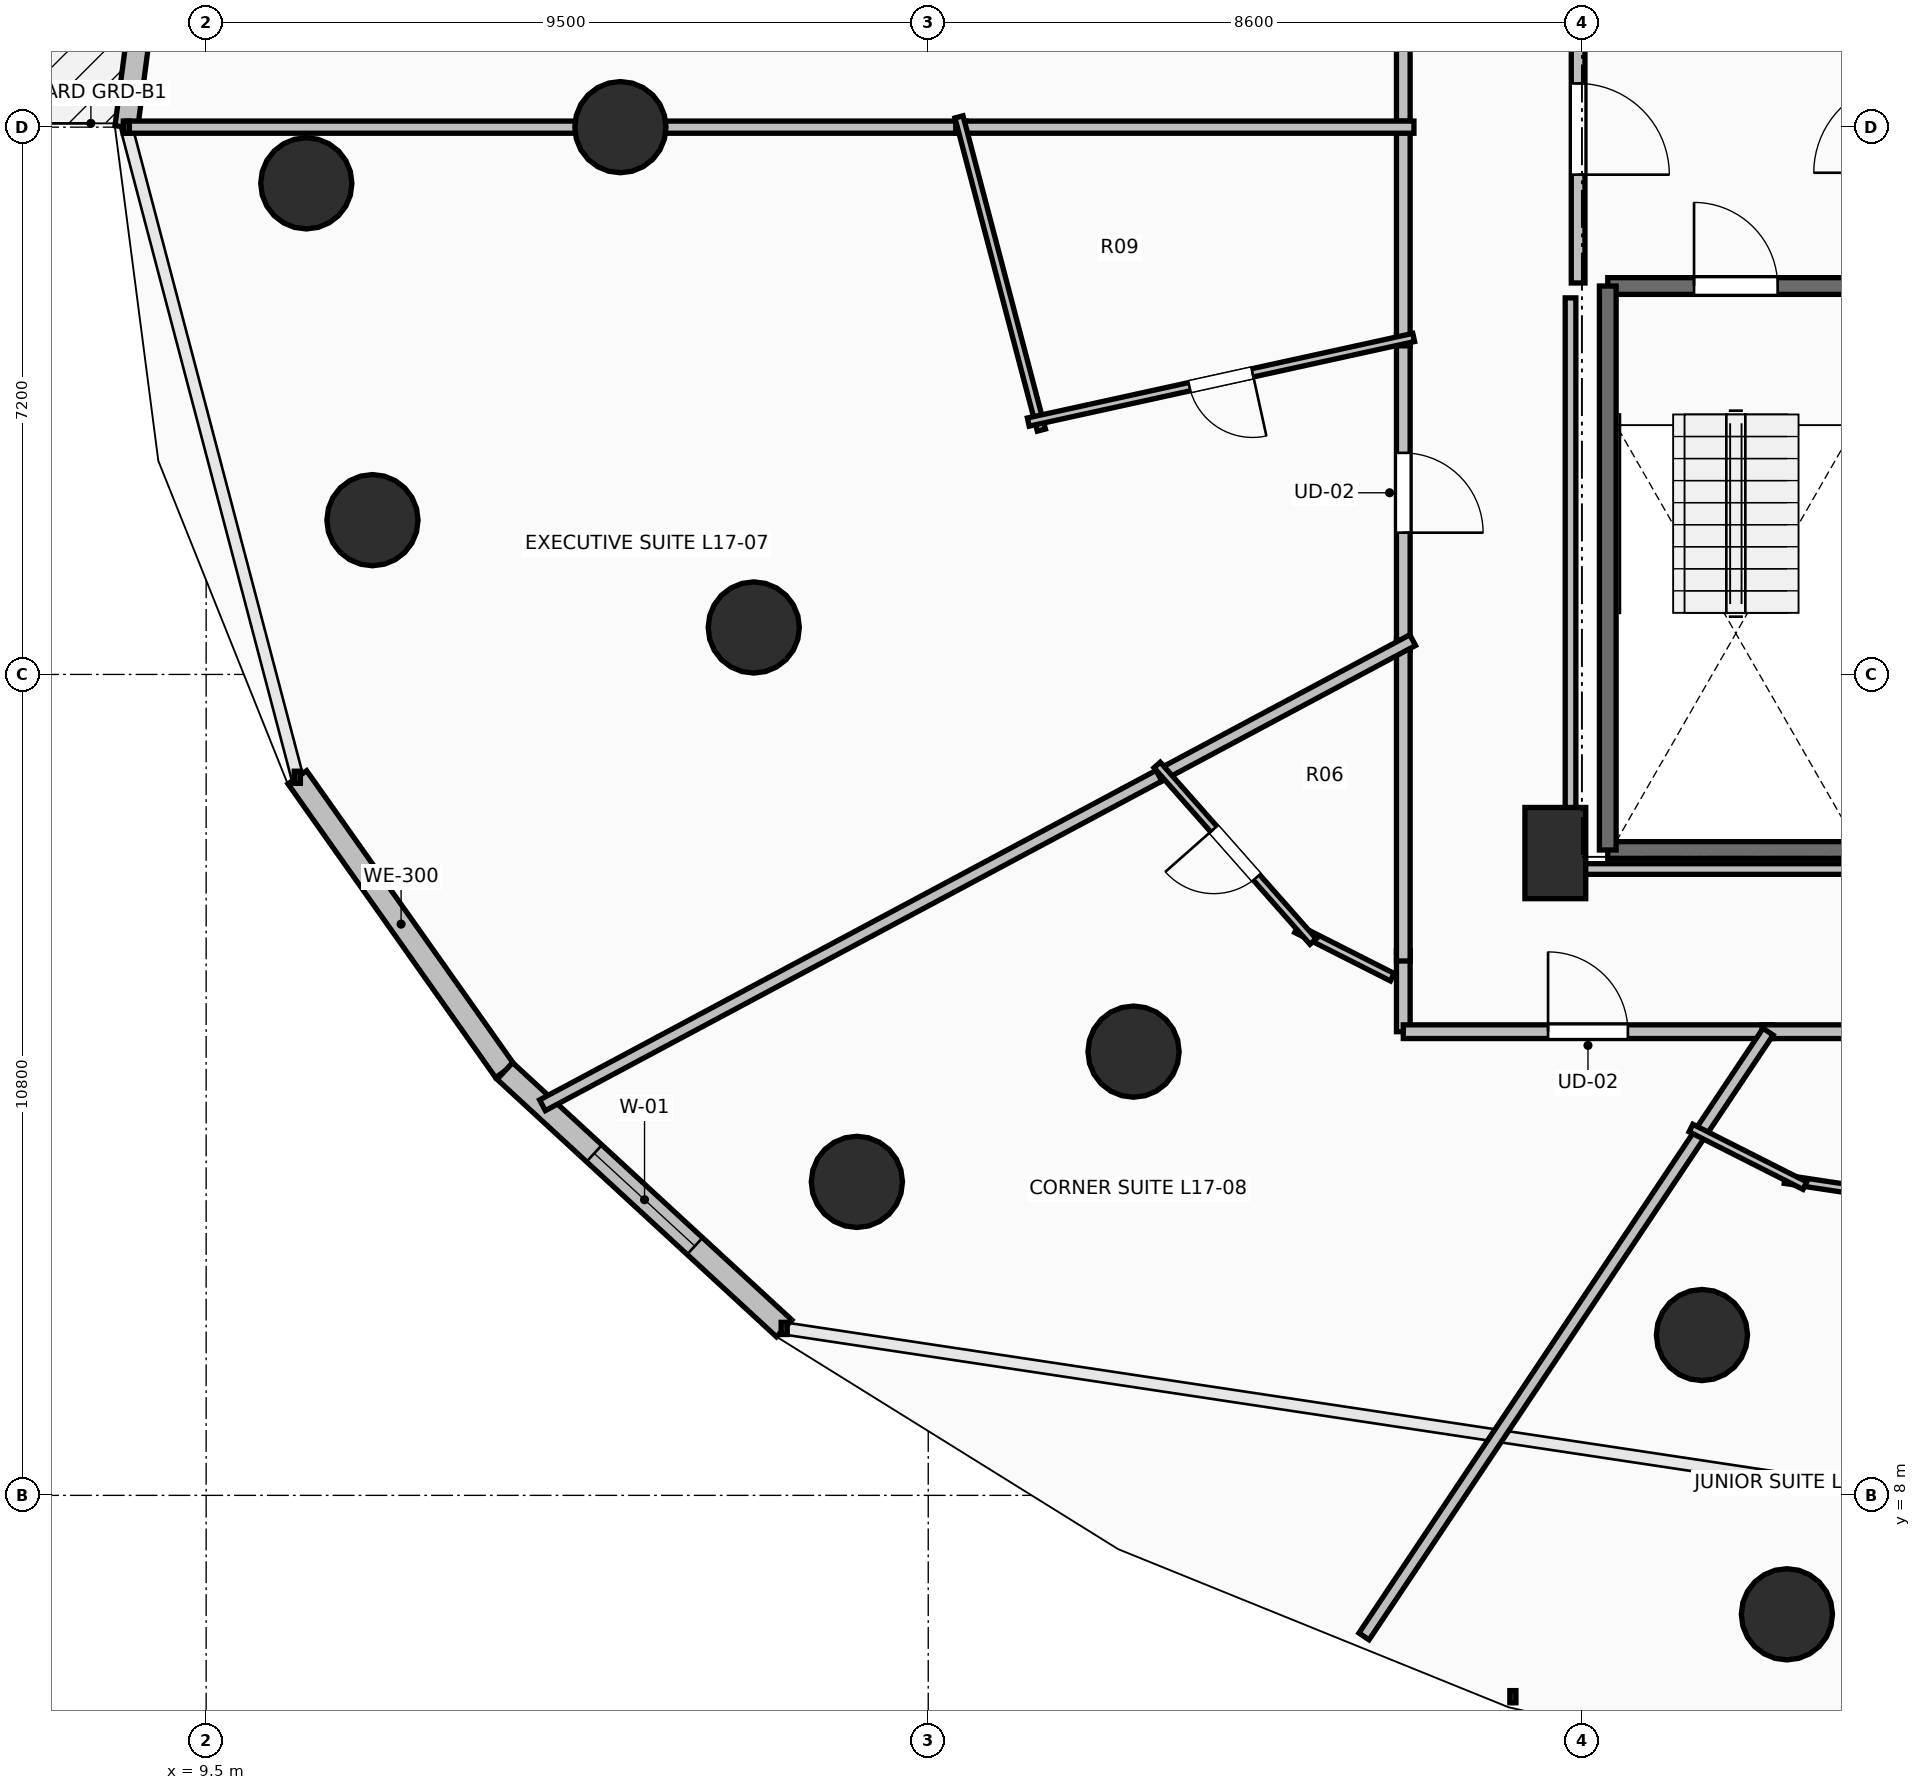
"""IFC4 building model, lengths in metres.
Left out: names, types, materials, properties, quantities, classifications, styles, units other than length and angle.
Written with IfcOpenShell. Run it as: python <this file> out.ifc"""

import sys

from ifc_helpers import new_model, si_unit, direction, frame, frame_2d, origin, origin_2d, place, context, subcontext, project, spatial, rectangle, circle, extrude, element, fill, save


model = new_model("IFC4")
c1 = context("Model", 3, precision=1e-05, world=origin(), true_north=direction((0.0, 1.0)))
c2 = subcontext(c1, "Body", "Model", "MODEL_VIEW")
j1 = project(units=[si_unit("LENGTHUNIT", "METRE"), si_unit("PLANEANGLEUNIT", "RADIAN")], contexts=[c1])
p1 = place(None, origin())
s1 = spatial("IfcSite", under=j1, at=p1, CompositionType="ELEMENT")
p2 = place(p1, origin())
s2 = spatial("IfcBuilding", under=s1, at=p2, CompositionType="ELEMENT")
p3 = place(p2, frame((0.0, 0.0, 66.0)))
s3 = spatial("IfcBuildingStorey", under=s2, at=p3, CompositionType="ELEMENT", Elevation=66.0)
for number, where, z_axis, x_axis in (
    (1, (14.95, 26.0, 0.0), (0.0, 0.0, 1.0), (-1.0, 0.0, 0.0)),
    (2, (16.705, 19.418, 0.0), (0.0, 0.0, 1.0), (-0.924, -0.383, 0.0)),
    (3, (21.701, 13.838, 0.0), (0.0, 0.0, 1.0), (-0.707, -0.707, 0.0)),
    (4, (29.179, 10.109, 0.0), (0.0, 0.0, 1.0), (-0.383, -0.924, 0.0)),
    (5, (10.818, 25.261, 0.0), (0.0, 0.0, 1.0), (-1.0, 0.0, 0.0)),
    (6, (11.688, 20.83, 0.0), (0.0, 0.0, 1.0), (-0.924, -0.383, 0.0)),
    (7, (18.061, 12.124, 0.0), (0.0, 0.0, 1.0), (-0.707, -0.707, 0.0)),
    (8, (30.297, 6.435, 0.0), (0.0, 0.0, 1.0), (-0.383, -0.924, 0.0)),
):
    element("IfcColumn", number, at=place(p3, frame(where, z_axis=z_axis, x_axis=x_axis)), inside=s3, PredefinedType="COLUMN", context=c2, shape_type="SweptSolid", body=[
        extrude(circle(Radius=0.6, at=origin_2d()), origin(), (0.0, 0.0, 1.0), 3.5),
    ])
p4 = place(p3, frame((27.25, 16.45, 0.0), z_axis=(0.0, 0.0, 1.0), x_axis=(1.0, 0.0, 0.0)))
e9 = element("IfcColumn", 9, at=p4, inside=s3, PredefinedType="PILASTER", context=c2, shape_type="SweptSolid", body=[
    extrude(rectangle(XDim=0.8, YDim=1.2, at=origin_2d()), origin(), (0.0, 0.0, 1.0), 3.5),
])
p5 = place(p3, frame((9.018, 30.36, 0.0), z_axis=(0.0, 0.0, 1.0), x_axis=(-0.129144544413, -0.99162577954, 0.0)))
e10 = element("IfcWall", 10, at=p5, inside=s3, PredefinedType="STANDARD", context=c2, shape_type="SweptSolid", body=[
    extrude(rectangle(XDim=4.397, YDim=0.3, at=frame_2d((2.199, 0.0))), origin(), (0.0, 0.0, 1.0), 3.15),
])
p6 = place(p5, frame((1.299, 0.0, 0.85)))
e11 = element("IfcOpeningElement", 11, at=p6, cuts=e10, PredefinedType="OPENING", context=c2, shape_type="SweptSolid", body=[
    extrude(rectangle(XDim=1.8, YDim=2.1, at=frame_2d((0.9, 1.05))), frame((0.0, 0.165, 0.0), z_axis=(0.0, -1.0, 0.0), x_axis=(1.0, 0.0, 0.0)), (0.0, 0.0, 1.0), 0.33),
])
p7 = place(p3, frame((10.699, 17.447, 0.0), z_axis=(0.0, 0.0, 1.0), x_axis=(0.577130815624, -0.816651713803, 0.0)))
e12 = element("IfcWall", 12, at=p7, inside=s3, PredefinedType="STANDARD", context=c2, shape_type="SweptSolid", body=[
    extrude(rectangle(XDim=4.731, YDim=0.3, at=frame_2d((2.366, 0.0))), origin(), (0.0, 0.0, 1.0), 3.15),
])
p8 = place(p3, frame((13.43, 13.583, 0.0), z_axis=(0.0, 0.0, 1.0), x_axis=(0.735342629635, -0.677695519419, 0.0)))
e13 = element("IfcWall", 13, at=p8, inside=s3, PredefinedType="STANDARD", context=c2, shape_type="SweptSolid", body=[
    extrude(rectangle(XDim=4.997, YDim=0.3, at=frame_2d((2.499, 0.0))), origin(), (0.0, 0.0, 1.0), 3.15),
])
p9 = place(p8, frame((1.599, 0.0, 0.85)))
e14 = element("IfcOpeningElement", 14, at=p9, cuts=e13, PredefinedType="OPENING", context=c2, shape_type="SweptSolid", body=[
    extrude(rectangle(XDim=1.8, YDim=2.1, at=frame_2d((0.9, 1.05))), frame((0.0, 0.165, 0.0), z_axis=(0.0, -1.0, 0.0), x_axis=(1.0, 0.0, 0.0)), (0.0, 0.0, 1.0), 0.33),
])
p10 = place(p3, frame((27.94, 23.91, 0.0), z_axis=(0.0, 0.0, 1.0), x_axis=(1.0, 0.0, 0.0)))
e15 = element("IfcWall", 15, at=p10, inside=s3, PredefinedType="SOLIDWALL", context=c2, shape_type="SweptSolid", body=[
    extrude(rectangle(XDim=3.37, YDim=0.22, at=frame_2d((1.685, 0.0))), origin(), (0.0, 0.0, 1.0), 3.15),
])
p11 = place(p10, frame((1.135, 0.0, 0.0)))
e16 = element("IfcOpeningElement", 16, at=p11, cuts=e15, PredefinedType="OPENING", context=c2, shape_type="SweptSolid", body=[
    extrude(rectangle(XDim=1.1, YDim=2.15, at=frame_2d((0.55, 1.075))), frame((0.0, 0.125, 0.0), z_axis=(0.0, -1.0, 0.0), x_axis=(1.0, 0.0, 0.0)), (0.0, 0.0, 1.0), 0.25),
])
p12 = place(p3, frame((31.31, 16.49, 0.0), z_axis=(0.0, 0.0, 1.0), x_axis=(-1.0, 0.0, 0.0)))
e17 = element("IfcWall", 17, at=p12, inside=s3, PredefinedType="SOLIDWALL", context=c2, shape_type="SweptSolid", body=[
    extrude(rectangle(XDim=3.37, YDim=0.22, at=frame_2d((1.685, 0.0))), origin(), (0.0, 0.0, 1.0), 3.15),
])
p13 = place(p3, frame((27.94, 16.49, 0.0), z_axis=(0.0, 0.0, 1.0), x_axis=(0.0, 1.0, 0.0)))
e18 = element("IfcWall", 18, at=p13, inside=s3, PredefinedType="SOLIDWALL", context=c2, shape_type="SweptSolid", body=[
    extrude(rectangle(XDim=7.42, YDim=0.22, at=frame_2d((3.71, 0.0))), origin(), (0.0, 0.0, 1.0), 3.15),
])
p14 = place(p3, frame((27.55, 28.0, 0.0), z_axis=(0.0, 0.0, 1.0), x_axis=(0.0, -1.0, 0.0)))
e19 = element("IfcWall", 19, at=p14, inside=s3, PredefinedType="PARTITIONING", context=c2, shape_type="SweptSolid", body=[
    extrude(rectangle(XDim=4.05, YDim=0.18, at=frame_2d((2.025, 0.0))), origin(), (0.0, 0.0, 1.0), 3.15),
])
p15 = place(p14, frame((1.425, 0.0, 0.0)))
e20 = element("IfcOpeningElement", 20, at=p15, cuts=e19, PredefinedType="OPENING", context=c2, shape_type="SweptSolid", body=[
    extrude(rectangle(XDim=1.2, YDim=2.15, at=frame_2d((0.6, 1.075))), frame((0.0, 0.105, 0.0), z_axis=(0.0, -1.0, 0.0), x_axis=(1.0, 0.0, 0.0)), (0.0, 0.0, 1.0), 0.21),
])
p16 = place(p3, frame((25.25, 29.658, 0.0), z_axis=(0.0, 0.0, 1.0), x_axis=(0.0, -1.0, 0.0)))
e21 = element("IfcWall", 21, at=p16, inside=s3, PredefinedType="PARTITIONING", context=c2, shape_type="SweptSolid", body=[
    extrude(rectangle(XDim=3.718, YDim=0.18, at=frame_2d((1.859, 0.0))), origin(), (0.0, 0.0, 1.0), 2.342),
])
p17 = place(p16, frame((1.334, 0.0, 0.0)))
e22 = element("IfcOpeningElement", 22, at=p17, cuts=e21, PredefinedType="OPENING", context=c2, shape_type="SweptSolid", body=[
    extrude(rectangle(XDim=1.05, YDim=2.2, at=frame_2d((0.525, 1.1))), frame((0.0, 0.105, 0.0), z_axis=(0.0, -1.0, 0.0), x_axis=(1.0, 0.0, 0.0)), (0.0, 0.0, 1.0), 0.21),
])
p18 = place(p3, frame((25.25, 23.263, 0.0), z_axis=(0.0, 0.0, 1.0), x_axis=(0.0, -1.0, 0.0)))
e23 = element("IfcWall", 23, at=p18, inside=s3, PredefinedType="PARTITIONING", context=c2, shape_type="SweptSolid", body=[
    extrude(rectangle(XDim=4.146, YDim=0.18, at=frame_2d((2.073, 0.0))), origin(), (0.0, 0.0, 1.0), 3.15),
])
p19 = place(p18, frame((1.548, 0.0, 0.0)))
e24 = element("IfcOpeningElement", 24, at=p19, cuts=e23, PredefinedType="OPENING", context=c2, shape_type="SweptSolid", body=[
    extrude(rectangle(XDim=1.05, YDim=2.2, at=frame_2d((0.525, 1.1))), frame((0.0, 0.105, 0.0), z_axis=(0.0, -1.0, 0.0), x_axis=(1.0, 0.0, 0.0)), (0.0, 0.0, 1.0), 0.21),
])
p20 = place(p3, frame((25.25, 26.08, 0.0), z_axis=(0.0, 0.0, 1.0), x_axis=(0.0, -1.0, 0.0)))
e25 = element("IfcWall", 25, at=p20, inside=s3, PredefinedType="PARTITIONING", context=c2, shape_type="SweptSolid", body=[
    extrude(rectangle(XDim=2.957, YDim=0.18, at=frame_2d((1.479, 0.0))), origin(), (0.0, 0.0, 1.0), 3.15),
])
p21 = place(p3, frame((25.25, 15.17, 0.0), z_axis=(0.0, 0.0, 1.0), x_axis=(0.0, -1.0, 0.0)))
e26 = element("IfcWall", 26, at=p21, inside=s3, PredefinedType="PARTITIONING", context=c2, shape_type="SweptSolid", body=[
    extrude(rectangle(XDim=1.07, YDim=0.18, at=frame_2d((0.535, 0.0))), origin(), (0.0, 0.0, 1.0), 2.784),
])
p22 = place(p3, frame((25.25, 14.1, 0.0), z_axis=(0.0, 0.0, 1.0), x_axis=(1.0, 0.0, 0.0)))
e27 = element("IfcWall", 27, at=p22, inside=s3, PredefinedType="PARTITIONING", context=c2, shape_type="SweptSolid", body=[
    extrude(rectangle(XDim=4.859, YDim=0.18, at=frame_2d((2.429, 0.0))), origin(), (0.0, 0.0, 1.0), 2.342),
])
p23 = place(p22, frame((1.905, 0.0, 0.0)))
e28 = element("IfcOpeningElement", 28, at=p23, cuts=e27, PredefinedType="OPENING", context=c2, shape_type="SweptSolid", body=[
    extrude(rectangle(XDim=1.05, YDim=2.2, at=frame_2d((0.525, 1.1))), frame((0.0, 0.105, 0.0), z_axis=(0.0, -1.0, 0.0), x_axis=(1.0, 0.0, 0.0)), (0.0, 0.0, 1.0), 0.21),
])
p24 = place(p3, frame((25.25, 19.257, 0.0), z_axis=(0.0, 0.0, 1.0), x_axis=(0.0, -1.0, 0.0)))
e29 = element("IfcWall", 29, at=p24, inside=s3, PredefinedType="PARTITIONING", context=c2, shape_type="SweptSolid", body=[
    extrude(rectangle(XDim=4.227, YDim=0.18, at=frame_2d((2.114, 0.0))), origin(), (0.0, 0.0, 1.0), 2.342),
])
p25 = place(p3, frame((29.969, 14.1, 0.0), z_axis=(0.0, 0.0, 1.0), x_axis=(1.0, 0.0, 0.0)))
e30 = element("IfcWall", 30, at=p25, inside=s3, PredefinedType="PARTITIONING", context=c2, shape_type="SweptSolid", body=[
    extrude(rectangle(XDim=5.153, YDim=0.18, at=frame_2d((2.577, 0.0))), origin(), (0.0, 0.0, 1.0), 3.15),
])
p26 = place(p3, frame((8.451, 26.0, 0.0), z_axis=(0.0, 0.0, 1.0), x_axis=(1.0, 0.0, 0.0)))
e31 = element("IfcWall", 31, at=p26, inside=s3, PredefinedType="PARTITIONING", context=c2, shape_type="SweptSolid", body=[
    extrude(rectangle(XDim=11.051, YDim=0.16, at=frame_2d((5.525, 0.0))), origin(), (0.0, 0.0, 1.0), 2.342),
])
p27 = place(p3, frame((19.362, 26.0, 0.0), z_axis=(0.0, 0.0, 1.0), x_axis=(1.0, 0.0, 0.0)))
e32 = element("IfcWall", 32, at=p27, inside=s3, PredefinedType="PARTITIONING", context=c2, shape_type="SweptSolid", body=[
    extrude(rectangle(XDim=6.028, YDim=0.16, at=frame_2d((3.014, 0.0))), origin(), (0.0, 0.0, 1.0), 2.784),
])
p28 = place(p3, frame((20.489, 22.015, 0.0), z_axis=(0.0, 0.0, 1.0), x_axis=(-0.254448175288, 0.967086410872, 0.0)))
e33 = element("IfcWall", 33, at=p28, inside=s3, PredefinedType="PARTITIONING", context=c2, shape_type="SweptSolid", body=[
    extrude(rectangle(XDim=4.261, YDim=0.11, at=frame_2d((2.13, 0.0))), origin(), (0.0, 0.0, 1.0), 3.15),
])
p29 = place(p3, frame((25.387, 23.233, 0.0), z_axis=(0.0, 0.0, 1.0), x_axis=(-0.976752510269, -0.214370085796, 0.0)))
e34 = element("IfcWall", 34, at=p29, inside=s3, PredefinedType="PARTITIONING", context=c2, shape_type="SweptSolid", body=[
    extrude(rectangle(XDim=5.191, YDim=0.11, at=frame_2d((2.595, 0.0))), origin(), (0.0, 0.0, 1.0), 2.784),
])
p30 = place(p29, frame((2.171, 0.0, 0.0)))
e35 = element("IfcOpeningElement", 35, at=p30, cuts=e34, PredefinedType="OPENING", context=c2, shape_type="SweptSolid", body=[
    extrude(rectangle(XDim=0.85, YDim=2.1, at=frame_2d((0.425, 1.05))), frame((0.0, 0.07, 0.0), z_axis=(0.0, -1.0, 0.0), x_axis=(1.0, 0.0, 0.0)), (0.0, 0.0, 1.0), 0.14),
])
p31 = place(p3, frame((13.925, 13.132, 0.0), z_axis=(0.0, 0.0, 1.0), x_axis=(0.881931293807, 0.471377972548, 0.0)))
e36 = element("IfcWall", 36, at=p31, inside=s3, PredefinedType="PARTITIONING", context=c2, shape_type="SweptSolid", body=[
    extrude(rectangle(XDim=9.336, YDim=0.16, at=frame_2d((4.668, 0.0))), origin(), (0.0, 0.0, 1.0), 2.534),
])
p32 = place(p3, frame((22.036, 17.467, 0.0), z_axis=(0.0, 0.0, 1.0), x_axis=(0.881916873027, 0.471404952317, 0.0)))
e37 = element("IfcWall", 37, at=p32, inside=s3, PredefinedType="PARTITIONING", context=c2, shape_type="SweptSolid", body=[
    extrude(rectangle(XDim=3.785, YDim=0.16, at=frame_2d((1.893, 0.0))), origin(), (0.0, 0.0, 1.0), 2.342),
])
p33 = place(p3, frame((25.106, 14.817, 0.0), z_axis=(0.0, 0.0, 1.0), x_axis=(-0.892342346526, 0.451359210161, 0.0)))
e38 = element("IfcWall", 38, at=p33, inside=s3, PredefinedType="PARTITIONING", context=c2, shape_type="SweptSolid", body=[
    extrude(rectangle(XDim=1.412, YDim=0.11, at=frame_2d((0.706, 0.0))), origin(), (0.0, 0.0, 1.0), 2.342),
])
p34 = place(p3, frame((24.064, 15.286, 0.0), z_axis=(0.0, 0.0, 1.0), x_axis=(-0.662165912504, 0.749357260802, 0.0)))
e39 = element("IfcWall", 39, at=p34, inside=s3, PredefinedType="PARTITIONING", context=c2, shape_type="SweptSolid", body=[
    extrude(rectangle(XDim=3.1, YDim=0.11, at=frame_2d((1.55, 0.0))), origin(), (0.0, 0.0, 1.0), 2.784),
])
p35 = place(p34, frame((1.125, 0.0, 0.0)))
e40 = element("IfcOpeningElement", 40, at=p35, cuts=e39, PredefinedType="OPENING", context=c2, shape_type="SweptSolid", body=[
    extrude(rectangle(XDim=0.85, YDim=2.1, at=frame_2d((0.425, 1.05))), frame((0.0, 0.07, 0.0), z_axis=(0.0, -1.0, 0.0), x_axis=(1.0, 0.0, 0.0)), (0.0, 0.0, 1.0), 0.14),
])
p36 = place(p3, frame((24.733, 6.144, 0.0), z_axis=(0.0, 0.0, 1.0), x_axis=(0.555577192504, 0.831464962082, 0.0)))
e41 = element("IfcWall", 41, at=p36, inside=s3, PredefinedType="PARTITIONING", context=c2, shape_type="SweptSolid", body=[
    extrude(rectangle(XDim=9.569, YDim=0.16, at=frame_2d((4.784, 0.0))), origin(), (0.0, 0.0, 1.0), 2.342),
])
p37 = place(p3, frame((34.545, 11.515, 0.0), z_axis=(0.0, 0.0, 1.0), x_axis=(-0.98886251361, 0.148831882259, 0.0)))
e42 = element("IfcWall", 42, at=p37, inside=s3, PredefinedType="PARTITIONING", context=c2, shape_type="SweptSolid", body=[
    extrude(rectangle(XDim=4.324, YDim=0.11, at=frame_2d((2.162, 0.0))), origin(), (0.0, 0.0, 1.0), 3.15),
])
p38 = place(p37, frame((1.737, 0.0, 0.0)))
e43 = element("IfcOpeningElement", 43, at=p38, cuts=e42, PredefinedType="OPENING", context=c2, shape_type="SweptSolid", body=[
    extrude(rectangle(XDim=0.85, YDim=2.1, at=frame_2d((0.425, 1.05))), frame((0.0, 0.07, 0.0), z_axis=(0.0, -1.0, 0.0), x_axis=(1.0, 0.0, 0.0)), (0.0, 0.0, 1.0), 0.14),
])
p39 = place(p3, frame((30.533, 12.075, 0.0), z_axis=(0.0, 0.0, 1.0), x_axis=(-0.892352223768, 0.451339682209, 0.0)))
e44 = element("IfcWall", 44, at=p39, inside=s3, PredefinedType="PARTITIONING", context=c2, shape_type="SweptSolid", body=[
    extrude(rectangle(XDim=1.678, YDim=0.11, at=frame_2d((0.839, 0.0))), origin(), (0.0, 0.0, 1.0), 2.784),
])
p40 = place(p3, frame((31.195, 16.24, 0.0), z_axis=(0.0, 0.0, 1.0), x_axis=(-1.0, 0.0, 0.0)))
e45 = element("IfcWall", 45, at=p40, inside=s3, PredefinedType="PARTITIONING", context=c2, shape_type="SweptSolid", body=[
    extrude(rectangle(XDim=3.745, YDim=0.14, at=frame_2d((1.873, 0.0))), origin(), (0.0, 0.0, 1.0), 2.342),
])
p41 = place(p3, frame((27.45, 16.24, 0.0), z_axis=(0.0, 0.0, 1.0), x_axis=(0.0, 1.0, 0.0)))
e46 = element("IfcWall", 46, at=p41, inside=s3, PredefinedType="PARTITIONING", context=c2, shape_type="SweptSolid", body=[
    extrude(rectangle(XDim=7.514, YDim=0.14, at=frame_2d((3.757, 0.0))), origin(), (0.0, 0.0, 1.0), 2.342),
])
p42 = place(p9, origin())
e47 = element("IfcWindow", 47, at=p42, inside=s3, PartitioningType="SINGLE_PANEL", PredefinedType="WINDOW", context=c2, shape_type="SweptSolid", body=[
    extrude(rectangle(XDim=1.8, YDim=2.1, at=frame_2d((0.9, 1.05))), frame((0.0, 0.03, 0.0), z_axis=(0.0, -1.0, 0.0), x_axis=(1.0, 0.0, 0.0)), (0.0, 0.0, 1.0), 0.06),
])
fill(e14, e47)
p43 = place(p11, origin())
e48 = element("IfcDoor", 48, at=p43, inside=s3, OperationType="SINGLE_SWING_LEFT", PredefinedType="DOOR", context=c2, shape_type="SweptSolid", body=[
    extrude(rectangle(XDim=1.1, YDim=2.15, at=frame_2d((0.55, 1.075))), frame((0.0, 0.025, 0.0), z_axis=(0.0, -1.0, 0.0), x_axis=(1.0, 0.0, 0.0)), (0.0, 0.0, 1.0), 0.05),
])
fill(e16, e48)
p44 = place(p15, origin())
e49 = element("IfcDoor", 49, at=p44, inside=s3, OperationType="SINGLE_SWING_RIGHT", PredefinedType="DOOR", context=c2, shape_type="SweptSolid", body=[
    extrude(rectangle(XDim=1.2, YDim=2.15, at=frame_2d((0.6, 1.075))), frame((0.0, 0.025, 0.0), z_axis=(0.0, -1.0, 0.0), x_axis=(1.0, 0.0, 0.0)), (0.0, 0.0, 1.0), 0.05),
])
fill(e20, e49)
p45 = place(p19, origin())
e50 = element("IfcDoor", 50, at=p45, inside=s3, OperationType="SINGLE_SWING_RIGHT", PredefinedType="DOOR", context=c2, shape_type="SweptSolid", body=[
    extrude(rectangle(XDim=1.05, YDim=2.2, at=frame_2d((0.525, 1.1))), frame((0.0, 0.025, 0.0), z_axis=(0.0, -1.0, 0.0), x_axis=(1.0, 0.0, 0.0)), (0.0, 0.0, 1.0), 0.05),
])
fill(e24, e50)
p46 = place(p23, origin())
e51 = element("IfcDoor", 51, at=p46, inside=s3, OperationType="SINGLE_SWING_LEFT", PredefinedType="DOOR", context=c2, shape_type="SweptSolid", body=[
    extrude(rectangle(XDim=1.05, YDim=2.2, at=frame_2d((0.525, 1.1))), frame((0.0, 0.025, 0.0), z_axis=(0.0, -1.0, 0.0), x_axis=(1.0, 0.0, 0.0)), (0.0, 0.0, 1.0), 0.05),
])
fill(e28, e51)
p47 = place(p30, origin())
e52 = element("IfcDoor", 52, at=p47, inside=s3, OperationType="SINGLE_SWING_LEFT", PredefinedType="DOOR", context=c2, shape_type="SweptSolid", body=[
    extrude(rectangle(XDim=0.85, YDim=2.1, at=frame_2d((0.425, 1.05))), frame((0.0, 0.025, 0.0), z_axis=(0.0, -1.0, 0.0), x_axis=(1.0, 0.0, 0.0)), (0.0, 0.0, 1.0), 0.05),
])
fill(e35, e52)
p48 = place(p35, origin())
e53 = element("IfcDoor", 53, at=p48, inside=s3, OperationType="SINGLE_SWING_RIGHT", PredefinedType="DOOR", context=c2, shape_type="SweptSolid", body=[
    extrude(rectangle(XDim=0.85, YDim=2.1, at=frame_2d((0.425, 1.05))), frame((0.0, 0.025, 0.0), z_axis=(0.0, -1.0, 0.0), x_axis=(1.0, 0.0, 0.0)), (0.0, 0.0, 1.0), 0.05),
])
fill(e40, e53)
save(model, sys.argv[1])
